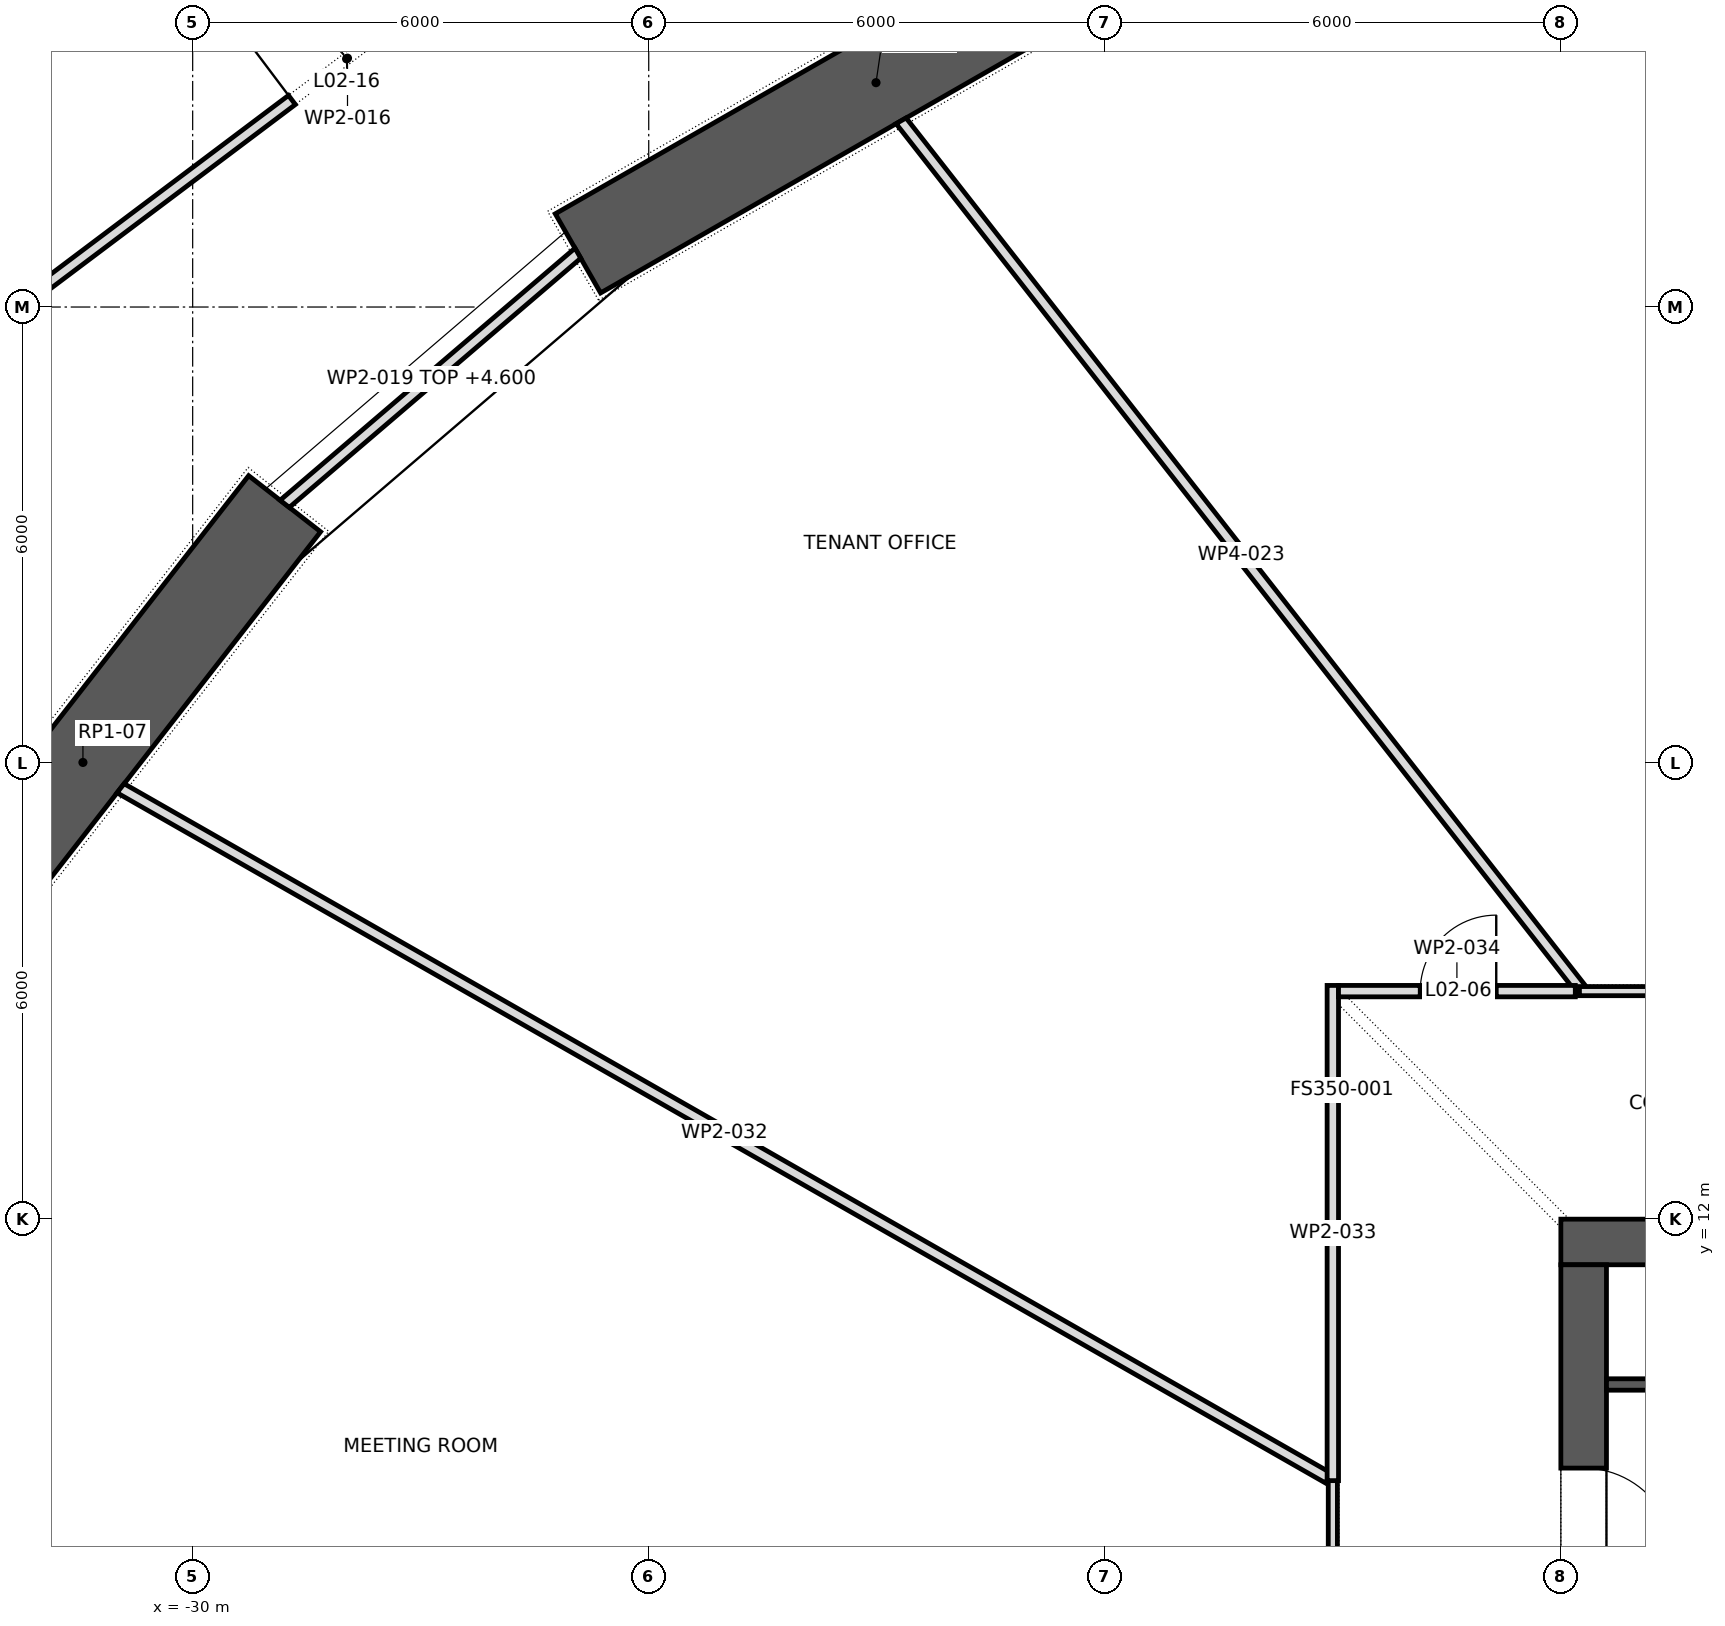
"""IFC4 building model, lengths in metres.
Left out: names, types, materials, properties, quantities, classifications, styles, units other than length and angle.
Written with IfcOpenShell. Run it as: python <this file> out.ifc"""

import sys

from ifc_helpers import new_model, si_unit, direction, frame, frame_2d, origin, place, context, subcontext, project, spatial, polyline, rectangle, outline, extrude, element, fill, save


model = new_model("IFC4")
c1 = context("Model", 3, precision=1e-05, world=origin(), true_north=direction((0.0, 1.0)))
c2 = subcontext(c1, "Body", "Model", "MODEL_VIEW")
j1 = project(units=[si_unit("LENGTHUNIT", "METRE"), si_unit("PLANEANGLEUNIT", "RADIAN")], contexts=[c1])
p1 = place(None, origin())
s1 = spatial("IfcSite", under=j1, at=p1, CompositionType="ELEMENT")
p2 = place(p1, origin())
s2 = spatial("IfcBuilding", under=s1, at=p2, CompositionType="ELEMENT")
p3 = place(p2, frame((0.0, 0.0, 12.5)))
s3 = spatial("IfcBuildingStorey", under=s2, at=p3, CompositionType="ELEMENT", Elevation=12.5)
p4 = place(p3, frame((-17.089, 29.198, 0.0), z_axis=(0.0, 0.0, 1.0), x_axis=(-0.867760656864, -0.496982336103, 0.0)))
e1 = element("IfcWall", 1, at=p4, inside=s3, PredefinedType="SHEAR", context=c2, shape_type="SweptSolid", body=[
    extrude(rectangle(XDim=9.038, YDim=1.2, at=frame_2d((4.519, 0.0))), origin(), (0.0, 0.0, 1.0), 5.5),
])
p5 = place(p3, frame((-28.79, 21.412, 0.0), z_axis=(0.0, 0.0, 1.0), x_axis=(-0.614825322247, -0.788663314174, 0.0)))
e2 = element("IfcWall", 2, at=p5, inside=s3, PredefinedType="SHEAR", context=c2, shape_type="SweptSolid", body=[
    extrude(rectangle(XDim=8.632, YDim=1.2, at=frame_2d((4.316, 0.0))), origin(), (0.0, 0.0, 1.0), 5.5),
])
p6 = place(p3, frame((-12.0, 11.7, 0.0), z_axis=(0.0, 0.0, 1.0), x_axis=(1.0, 0.0, 0.0)))
e3 = element("IfcWall", 3, at=p6, inside=s3, PredefinedType="SHEAR", context=c2, shape_type="SweptSolid", body=[
    extrude(rectangle(XDim=24.0, YDim=0.6, at=frame_2d((12.0, 0.0))), origin(), (0.0, 0.0, 1.0), 5.5),
])
p7 = place(p6, frame((9.025, 0.0, 0.0)))
e4 = element("IfcOpeningElement", 4, at=p7, cuts=e3, PredefinedType="OPENING", context=c2, shape_type="SweptSolid", body=[
    extrude(rectangle(XDim=0.8, YDim=2.1, at=frame_2d((0.4, 1.05))), frame((0.0, 0.312, 0.0), z_axis=(0.0, -1.0, 0.0), x_axis=(1.0, 0.0, 0.0)), (0.0, 0.0, 1.0), 0.624),
])
p8 = place(p6, frame((10.625, 0.0, 0.0)))
e5 = element("IfcOpeningElement", 5, at=p8, cuts=e3, PredefinedType="OPENING", context=c2, shape_type="SweptSolid", body=[
    extrude(rectangle(XDim=0.9, YDim=2.1, at=frame_2d((0.45, 1.05))), frame((0.0, 0.312, 0.0), z_axis=(0.0, -1.0, 0.0), x_axis=(1.0, 0.0, 0.0)), (0.0, 0.0, 1.0), 0.624),
])
p9 = place(p6, frame((4.2, 0.0, 0.0)))
e6 = element("IfcOpeningElement", 6, at=p9, cuts=e3, PredefinedType="OPENING", context=c2, shape_type="SweptSolid", body=[
    extrude(rectangle(XDim=0.8, YDim=2.1, at=frame_2d((0.4, 1.05))), frame((0.0, 0.312, 0.0), z_axis=(0.0, -1.0, 0.0), x_axis=(1.0, 0.0, 0.0)), (0.0, 0.0, 1.0), 0.624),
])
p10 = place(p6, frame((6.2, 0.0, 0.0)))
e7 = element("IfcOpeningElement", 7, at=p10, cuts=e3, PredefinedType="OPENING", context=c2, shape_type="SweptSolid", body=[
    extrude(rectangle(XDim=0.8, YDim=2.1, at=frame_2d((0.4, 1.05))), frame((0.0, 0.312, 0.0), z_axis=(0.0, -1.0, 0.0), x_axis=(1.0, 0.0, 0.0)), (0.0, 0.0, 1.0), 0.624),
])
p11 = place(p6, frame((7.7, 0.0, 0.0)))
e8 = element("IfcOpeningElement", 8, at=p11, cuts=e3, PredefinedType="OPENING", context=c2, shape_type="SweptSolid", body=[
    extrude(rectangle(XDim=0.8, YDim=2.1, at=frame_2d((0.4, 1.05))), frame((0.0, 0.312, 0.0), z_axis=(0.0, -1.0, 0.0), x_axis=(1.0, 0.0, 0.0)), (0.0, 0.0, 1.0), 0.624),
])
p12 = place(p6, frame((15.85, 0.0, 0.0)))
e9 = element("IfcOpeningElement", 9, at=p12, cuts=e3, PredefinedType="OPENING", context=c2, shape_type="SweptSolid", body=[
    extrude(rectangle(XDim=0.8, YDim=2.1, at=frame_2d((0.4, 1.05))), frame((0.0, 0.312, 0.0), z_axis=(0.0, -1.0, 0.0), x_axis=(1.0, 0.0, 0.0)), (0.0, 0.0, 1.0), 0.624),
])
p13 = place(p3, frame((-11.7, -11.4, 0.0), z_axis=(0.0, 0.0, 1.0), x_axis=(0.0, 1.0, 0.0)))
e10 = element("IfcWall", 10, at=p13, inside=s3, PredefinedType="SHEAR", context=c2, shape_type="SweptSolid", body=[
    extrude(rectangle(XDim=22.8, YDim=0.6, at=frame_2d((11.4, 0.0))), origin(), (0.0, 0.0, 1.0), 5.5),
])
p14 = place(p13, frame((10.2, 0.0, 0.0)))
e11 = element("IfcOpeningElement", 11, at=p14, cuts=e10, PredefinedType="OPENING", context=c2, shape_type="SweptSolid", body=[
    extrude(rectangle(XDim=2.4, YDim=2.1, at=frame_2d((1.2, 1.05))), frame((0.0, 0.312, 0.0), z_axis=(0.0, -1.0, 0.0), x_axis=(1.0, 0.0, 0.0)), (0.0, 0.0, 1.0), 0.624),
])
p15 = place(p13, frame((18.925, 0.0, 0.0)))
e12 = element("IfcOpeningElement", 12, at=p15, cuts=e10, PredefinedType="OPENING", context=c2, shape_type="SweptSolid", body=[
    extrude(rectangle(XDim=1.2, YDim=2.1, at=frame_2d((0.6, 1.05))), frame((0.0, 0.312, 0.0), z_axis=(0.0, -1.0, 0.0), x_axis=(1.0, 0.0, 0.0)), (0.0, 0.0, 1.0), 0.624),
])
p16 = place(p13, frame((2.675, 0.0, 0.0)))
e13 = element("IfcOpeningElement", 13, at=p16, cuts=e10, PredefinedType="OPENING", context=c2, shape_type="SweptSolid", body=[
    extrude(rectangle(XDim=1.2, YDim=2.1, at=frame_2d((0.6, 1.05))), frame((0.0, 0.312, 0.0), z_axis=(0.0, -1.0, 0.0), x_axis=(1.0, 0.0, 0.0)), (0.0, 0.0, 1.0), 0.624),
])
p17 = place(p3, frame((-11.4, 9.825, 0.0), z_axis=(0.0, 0.0, 1.0), x_axis=(1.0, 0.0, 0.0)))
e14 = element("IfcWall", 14, at=p17, inside=s3, PredefinedType="SHEAR", context=c2, shape_type="SweptSolid", body=[
    extrude(rectangle(XDim=8.0, YDim=0.15, at=frame_2d((4.0, 0.0))), origin(), (0.0, 0.0, 1.0), 5.15),
])
p18 = place(p3, frame((-32.225, 24.069, 0.0), z_axis=(0.0, 0.0, 1.0), x_axis=(0.799199975682, 0.601065220147, 0.0)))
e15 = element("IfcWall", 15, at=p18, inside=s3, PredefinedType="PARTITIONING", context=c2, shape_type="SweptSolid", body=[
    extrude(rectangle(XDim=10.666, YDim=0.15, at=frame_2d((5.333, 0.0))), origin(), (0.0, 0.0, 1.0), 5.15),
])
p19 = place(p18, frame((4.418, 0.0, 0.0)))
e16 = element("IfcOpeningElement", 16, at=p19, cuts=e15, PredefinedType="OPENING", context=c2, shape_type="SweptSolid", body=[
    extrude(rectangle(XDim=1.8, YDim=2.1, at=frame_2d((0.9, 1.05))), frame((0.0, 0.087, 0.0), z_axis=(0.0, -1.0, 0.0), x_axis=(1.0, 0.0, 0.0)), (0.0, 0.0, 1.0), 0.174),
])
p20 = place(p3, frame((-24.932, 24.708, 0.0), z_axis=(0.0, 0.0, 1.0), x_axis=(-0.760084552743, -0.649824185978, 0.0)))
e17 = element("IfcWall", 17, at=p20, inside=s3, PredefinedType="PARTITIONING", context=c2, shape_type="SweptSolid", body=[
    extrude(outline(polyline([(-0.014, -0.075), (5.09, -0.075), (5.06, 0.075), (0.014, 0.075), (-0.014, -0.075)])), origin(), (0.0, 0.0, 1.0), 4.6),
])
p21 = place(p3, frame((-20.68, 26.45, 0.0), z_axis=(0.0, 0.0, 1.0), x_axis=(0.616461511357, -0.787385042413, 0.0)))
e18 = element("IfcWall", 18, at=p21, inside=s3, PredefinedType="PARTITIONING", context=c2, shape_type="SweptSolid", body=[
    extrude(outline(polyline([(-0.011, -0.075), (14.518, -0.075), (14.518, 0.075), (0.011, 0.075), (-0.011, -0.075)])), origin(), (0.0, 0.0, 1.0), 5.15),
])
p22 = place(p3, frame((-15.0, 1.26, 0.0), z_axis=(0.0, 0.0, 1.0), x_axis=(0.0, 1.0, 0.0)))
e19 = element("IfcWall", 19, at=p22, inside=s3, PredefinedType="PARTITIONING", context=c2, shape_type="SweptSolid", body=[
    extrude(rectangle(XDim=7.386, YDim=0.12, at=frame_2d((3.693, 0.0))), origin(), (0.0, 0.0, 1.0), 5.15),
])
p23 = place(p22, frame((2.722, 0.0, 0.0)))
e20 = element("IfcOpeningElement", 20, at=p23, cuts=e19, PredefinedType="OPENING", context=c2, shape_type="SweptSolid", body=[
    extrude(rectangle(XDim=1.8, YDim=2.1, at=frame_2d((0.9, 1.05))), frame((0.0, 0.072, 0.0), z_axis=(0.0, -1.0, 0.0), x_axis=(1.0, 0.0, 0.0)), (0.0, 0.0, 1.0), 0.144),
])
p24 = place(p3, frame((-15.06, 8.594, 0.0), z_axis=(0.0, 0.0, 1.0), x_axis=(-0.868344118251, 0.495962188376, 0.0)))
e21 = element("IfcWall", 21, at=p24, inside=s3, PredefinedType="PARTITIONING", context=c2, shape_type="SweptSolid", body=[
    extrude(outline(polyline([(0.0, -0.075), (18.287, -0.075), (18.308, 0.075), (0.0, 0.075), (0.0, -0.075)])), origin(), (0.0, 0.0, 1.0), 5.15),
])
p25 = place(p3, frame((-15.0, 8.56, 0.0), z_axis=(0.0, 0.0, 1.0), x_axis=(0.0, 1.0, 0.0)))
e22 = element("IfcWall", 22, at=p25, inside=s3, PredefinedType="PARTITIONING", context=c2, shape_type="SweptSolid", body=[
    extrude(rectangle(XDim=6.515, YDim=0.15, at=frame_2d((3.257, 0.0))), origin(), (0.0, 0.0, 1.0), 5.15),
])
p26 = place(p3, frame((-14.925, 15.0, 0.0), z_axis=(0.0, 0.0, 1.0), x_axis=(1.0, 0.0, 0.0)))
e23 = element("IfcWall", 23, at=p26, inside=s3, PredefinedType="PARTITIONING", context=c2, shape_type="SweptSolid", body=[
    extrude(rectangle(XDim=3.115, YDim=0.15, at=frame_2d((1.558, 0.0))), origin(), (0.0, 0.0, 1.0), 5.15),
])
p27 = place(p26, frame((1.075, 0.0, 0.0)))
e24 = element("IfcOpeningElement", 24, at=p27, cuts=e23, PredefinedType="OPENING", context=c2, shape_type="SweptSolid", body=[
    extrude(rectangle(XDim=1.0, YDim=2.1, at=frame_2d((0.5, 1.05))), frame((0.0, 0.087, 0.0), z_axis=(0.0, -1.0, 0.0), x_axis=(1.0, 0.0, 0.0)), (0.0, 0.0, 1.0), 0.174),
])
p28 = place(p3, frame((-11.756, 15.0, 0.0), z_axis=(0.0, 0.0, 1.0), x_axis=(1.0, 0.0, 0.0)))
e25 = element("IfcWall", 25, at=p28, inside=s3, PredefinedType="PARTITIONING", context=c2, shape_type="SweptSolid", body=[
    extrude(rectangle(XDim=10.616, YDim=0.12, at=frame_2d((5.308, 0.0))), origin(), (0.0, 0.0, 1.0), 5.15),
])
p29 = place(p28, frame((4.386, 0.0, 0.0)))
e26 = element("IfcOpeningElement", 26, at=p29, cuts=e25, PredefinedType="OPENING", context=c2, shape_type="SweptSolid", body=[
    extrude(rectangle(XDim=1.8, YDim=2.1, at=frame_2d((0.9, 1.05))), frame((0.0, 0.072, 0.0), z_axis=(0.0, -1.0, 0.0), x_axis=(1.0, 0.0, 0.0)), (0.0, 0.0, 1.0), 0.144),
])
p30 = place(p15, frame((1.2, 0.0, 0.0), z_axis=(0.0, 0.0, 1.0), x_axis=(-1.0, 0.0, 0.0)))
e27 = element("IfcDoor", 27, at=p30, inside=s3, OperationType="SINGLE_SWING_LEFT", PredefinedType="DOOR", context=c2, shape_type="SweptSolid", body=[
    extrude(rectangle(XDim=1.2, YDim=2.1, at=frame_2d((0.6, 1.05))), frame((0.0, 0.025, 0.0), z_axis=(0.0, -1.0, 0.0), x_axis=(1.0, 0.0, 0.0)), (0.0, 0.0, 1.0), 0.05),
])
fill(e12, e27)
p31 = place(p27, origin())
e28 = element("IfcDoor", 28, at=p31, inside=s3, OperationType="SINGLE_SWING_LEFT", PredefinedType="DOOR", context=c2, shape_type="SweptSolid", body=[
    extrude(rectangle(XDim=1.0, YDim=2.1, at=frame_2d((0.5, 1.05))), frame((0.0, 0.025, 0.0), z_axis=(0.0, -1.0, 0.0), x_axis=(1.0, 0.0, 0.0)), (0.0, 0.0, 1.0), 0.05),
])
fill(e24, e28)
p32 = place(p19, origin())
e29 = element("IfcDoor", 29, at=p32, inside=s3, OperationType="DOUBLE_DOOR_SINGLE_SWING", PredefinedType="DOOR", context=c2, shape_type="SweptSolid", body=[
    extrude(rectangle(XDim=1.8, YDim=2.1, at=frame_2d((0.9, 1.05))), frame((0.0, 0.025, 0.0), z_axis=(0.0, -1.0, 0.0), x_axis=(1.0, 0.0, 0.0)), (0.0, 0.0, 1.0), 0.05),
])
fill(e16, e29)
save(model, sys.argv[1])
